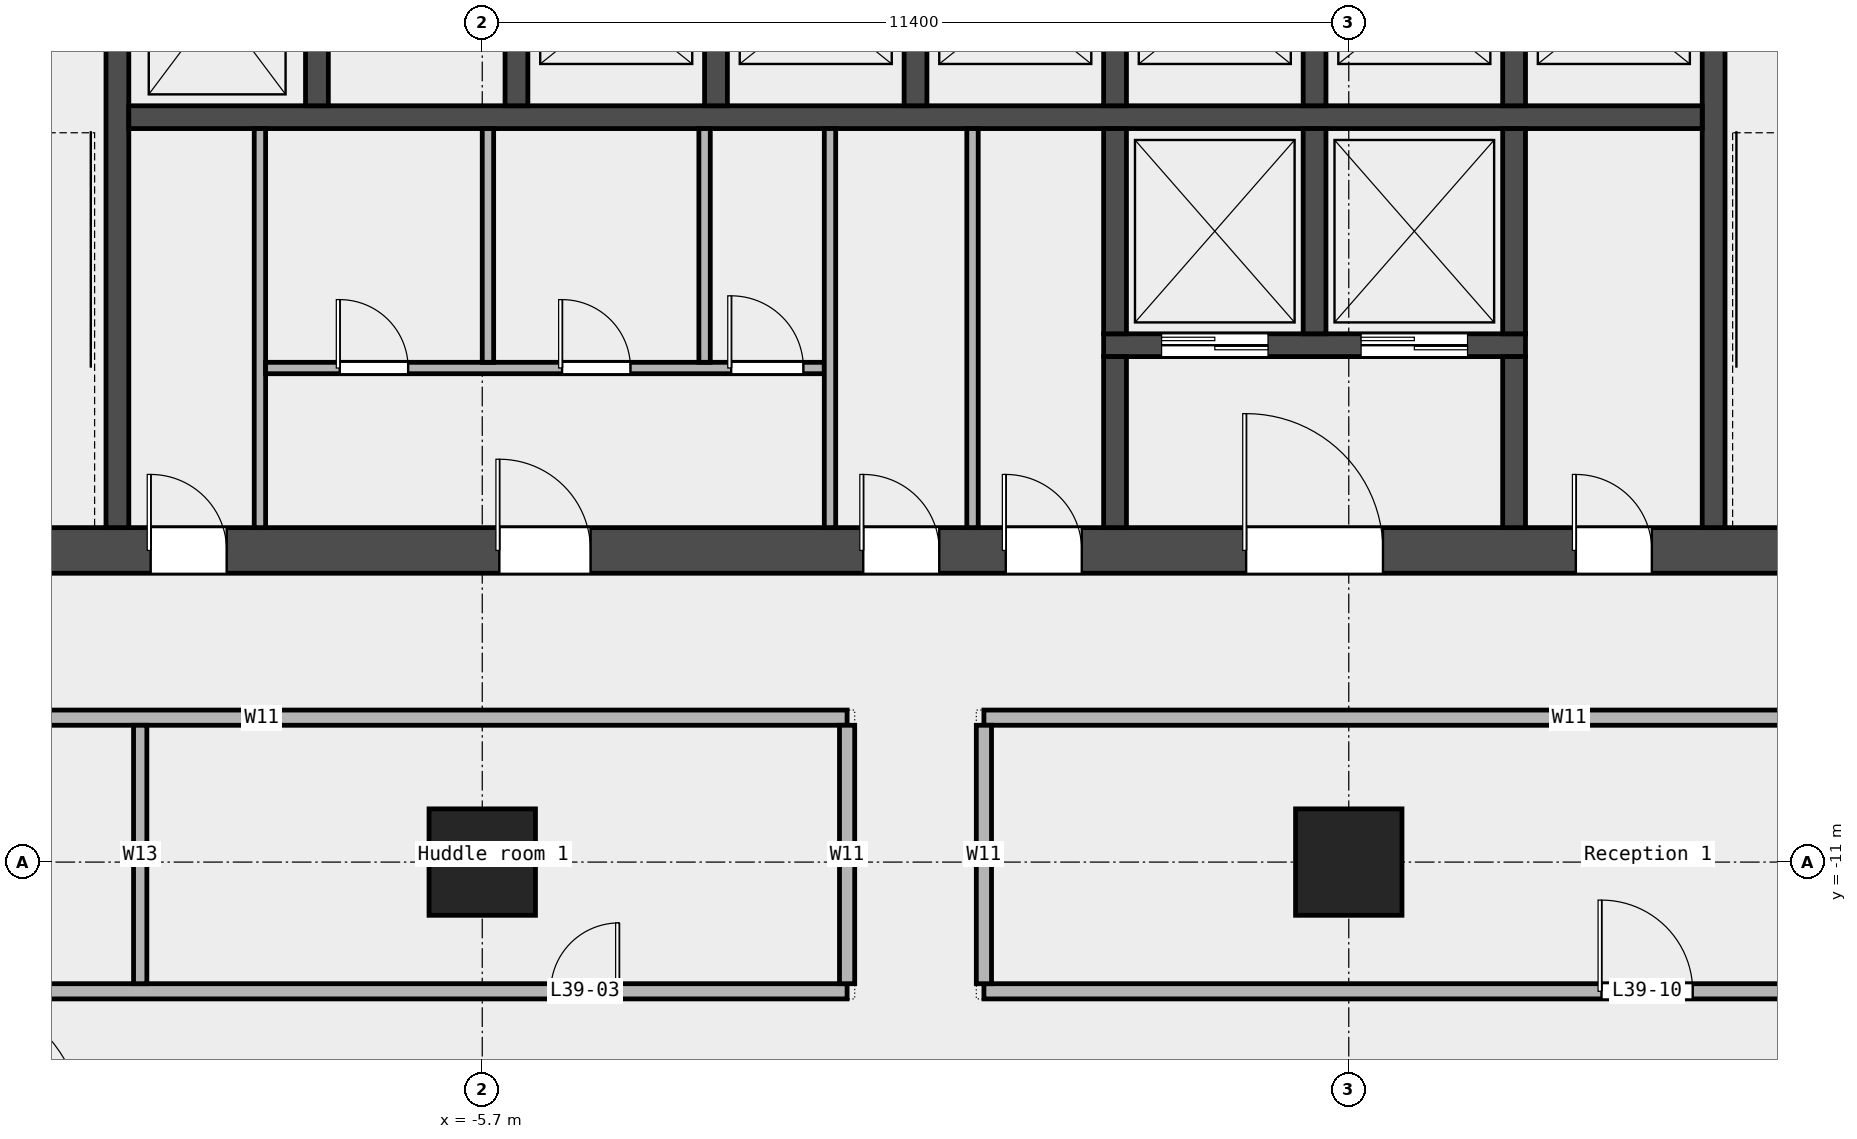
"""IFC4 building model, lengths in metres.
Left out: names, types, materials, properties, quantities, classifications, styles, units other than length and angle.
Written with IfcOpenShell. Run it as: python <this file> out.ifc"""

import sys

from ifc_helpers import new_model, si_unit, direction, frame, frame_2d, origin, origin_2d, place, context, subcontext, project, spatial, rectangle, extrude, element, fill, save


model = new_model("IFC4")
c1 = context("Model", 3, precision=1e-05, world=origin(), true_north=direction((0.0, 1.0)))
c2 = subcontext(c1, "Body", "Model", "MODEL_VIEW")
j1 = project(units=[si_unit("LENGTHUNIT", "METRE"), si_unit("PLANEANGLEUNIT", "RADIAN")], contexts=[c1])
p1 = place(None, origin())
s1 = spatial("IfcSite", under=j1, at=p1, CompositionType="ELEMENT")
p2 = place(p1, origin())
s2 = spatial("IfcBuilding", under=s1, at=p2, CompositionType="ELEMENT")
p3 = place(p2, frame((0.0, 0.0, 189.0)))
s3 = spatial("IfcBuildingStorey", under=s2, at=p3, CompositionType="ELEMENT", Elevation=189.0)
for number, where, z_axis, x_axis in (
    (1, (-5.7, -11.0, 0.0), (0.0, 0.0, 1.0), (1.0, 0.0, 0.0)),
    (2, (5.7, -11.0, 0.0), (0.0, 0.0, 1.0), (1.0, 0.0, 0.0)),
):
    element("IfcColumn", number, at=place(p3, frame(where, z_axis=z_axis, x_axis=x_axis)), inside=s3, PredefinedType="COLUMN", context=c2, shape_type="SweptSolid", body=[
        extrude(rectangle(XDim=1.4, YDim=1.4, at=origin_2d()), origin(), (0.0, 0.0, 1.0), 3.6),
    ])
p4 = place(p3, frame((-24.15, -12.7, 0.0), z_axis=(0.0, 0.0, 1.0), x_axis=(1.0, 0.0, 0.0)))
e3 = element("IfcWall", 3, at=p4, inside=s3, PredefinedType="PARTITIONING", context=c2, shape_type="SweptSolid", body=[
    extrude(rectangle(XDim=23.25, YDim=0.2, at=frame_2d((11.625, 0.0))), origin(), (0.0, 0.0, 1.0), 3.6),
])
p5 = place(p4, frame((19.35, 0.0, 0.0)))
e4 = element("IfcOpeningElement", 4, at=p5, cuts=e3, PredefinedType="OPENING", context=c2, shape_type="SweptSolid", body=[
    extrude(rectangle(XDim=0.9, YDim=2.1, at=frame_2d((0.45, 1.05))), frame((0.0, 0.112, 0.0), z_axis=(0.0, -1.0, 0.0), x_axis=(1.0, 0.0, 0.0)), (0.0, 0.0, 1.0), 0.224),
])
p6 = place(p4, frame((7.825, 0.0, 0.0)))
e5 = element("IfcOpeningElement", 5, at=p6, cuts=e3, PredefinedType="OPENING", context=c2, shape_type="SweptSolid", body=[
    extrude(rectangle(XDim=1.5, YDim=2.1, at=frame_2d((0.75, 1.05))), frame((0.0, 0.112, 0.0), z_axis=(0.0, -1.0, 0.0), x_axis=(1.0, 0.0, 0.0)), (0.0, 0.0, 1.0), 0.224),
])
p7 = place(p3, frame((0.9, -12.7, 0.0), z_axis=(0.0, 0.0, 1.0), x_axis=(1.0, 0.0, 0.0)))
e6 = element("IfcWall", 6, at=p7, inside=s3, PredefinedType="PARTITIONING", context=c2, shape_type="SweptSolid", body=[
    extrude(rectangle(XDim=25.25, YDim=0.2, at=frame_2d((12.625, 0.0))), origin(), (0.0, 0.0, 1.0), 3.6),
])
p8 = place(p7, frame((20.75, 0.0, 0.0)))
e7 = element("IfcOpeningElement", 7, at=p8, cuts=e6, PredefinedType="OPENING", context=c2, shape_type="SweptSolid", body=[
    extrude(rectangle(XDim=1.0, YDim=2.1, at=frame_2d((0.5, 1.05))), frame((0.0, 0.112, 0.0), z_axis=(0.0, -1.0, 0.0), x_axis=(1.0, 0.0, 0.0)), (0.0, 0.0, 1.0), 0.224),
])
p9 = place(p7, frame((8.125, 0.0, 0.0)))
e8 = element("IfcOpeningElement", 8, at=p9, cuts=e6, PredefinedType="OPENING", context=c2, shape_type="SweptSolid", body=[
    extrude(rectangle(XDim=1.2, YDim=2.1, at=frame_2d((0.6, 1.05))), frame((0.0, 0.112, 0.0), z_axis=(0.0, -1.0, 0.0), x_axis=(1.0, 0.0, 0.0)), (0.0, 0.0, 1.0), 0.224),
])
for number, where, z_axis, x_axis in (
    (9, (-16.3, -9.1, 0.0), (0.0, 0.0, 1.0), (1.0, 0.0, 0.0)),
    (10, (0.9, -9.1, 0.0), (0.0, 0.0, 1.0), (1.0, 0.0, 0.0)),
):
    element("IfcWall", number, at=place(p3, frame(where, z_axis=z_axis, x_axis=x_axis)), inside=s3, PredefinedType="PARTITIONING", context=c2, shape_type="SweptSolid", body=[
        extrude(rectangle(XDim=15.4, YDim=0.2, at=frame_2d((7.7, 0.0))), origin(), (0.0, 0.0, 1.0), 3.6),
    ])
p10 = place(p3, frame((-10.2, -12.6, 0.0), z_axis=(0.0, 0.0, 1.0), x_axis=(0.0, 1.0, 0.0)))
e11 = element("IfcWall", 11, at=p10, inside=s3, PredefinedType="PARTITIONING", context=c2, shape_type="SweptSolid", body=[
    extrude(rectangle(XDim=3.4, YDim=0.175, at=frame_2d((1.7, 0.0))), origin(), (0.0, 0.0, 1.0), 3.6),
])
for number, where, z_axis, x_axis in (
    (12, (-0.9, -12.6, 0.0), (0.0, 0.0, 1.0), (0.0, 1.0, 0.0)),
    (13, (0.9, -12.6, 0.0), (0.0, 0.0, 1.0), (0.0, 1.0, 0.0)),
):
    element("IfcWall", number, at=place(p3, frame(where, z_axis=z_axis, x_axis=x_axis)), inside=s3, PredefinedType="PARTITIONING", context=c2, shape_type="SweptSolid", body=[
        extrude(rectangle(XDim=3.4, YDim=0.2, at=frame_2d((1.7, 0.0))), origin(), (0.0, 0.0, 1.0), 3.6),
    ])
p11 = place(p3, frame((-14.4, -6.9, 0.0), z_axis=(0.0, 0.0, 1.0), x_axis=(1.0, 0.0, 0.0)))
e14 = element("IfcWall", 14, at=p11, inside=s3, PredefinedType="SHEAR", context=c2, shape_type="SweptSolid", body=[
    extrude(rectangle(XDim=28.8, YDim=0.6, at=frame_2d((14.4, 0.0))), origin(), (0.0, 0.0, 1.0), 3.7),
])
p12 = place(p11, frame((4.337, 0.0, 0.0)))
e15 = element("IfcOpeningElement", 15, at=p12, cuts=e14, PredefinedType="OPENING", context=c2, shape_type="SweptSolid", body=[
    extrude(rectangle(XDim=1.0, YDim=2.1, at=frame_2d((0.5, 1.05))), frame((0.0, 0.312, 0.0), z_axis=(0.0, -1.0, 0.0), x_axis=(1.0, 0.0, 0.0)), (0.0, 0.0, 1.0), 0.624),
])
p13 = place(p11, frame((8.925, 0.0, 0.0)))
e16 = element("IfcOpeningElement", 16, at=p13, cuts=e14, PredefinedType="OPENING", context=c2, shape_type="SweptSolid", body=[
    extrude(rectangle(XDim=1.2, YDim=2.1, at=frame_2d((0.6, 1.05))), frame((0.0, 0.312, 0.0), z_axis=(0.0, -1.0, 0.0), x_axis=(1.0, 0.0, 0.0)), (0.0, 0.0, 1.0), 0.624),
])
p14 = place(p11, frame((13.712, 0.0, 0.0)))
e17 = element("IfcOpeningElement", 17, at=p14, cuts=e14, PredefinedType="OPENING", context=c2, shape_type="SweptSolid", body=[
    extrude(rectangle(XDim=1.0, YDim=2.1, at=frame_2d((0.5, 1.05))), frame((0.0, 0.312, 0.0), z_axis=(0.0, -1.0, 0.0), x_axis=(1.0, 0.0, 0.0)), (0.0, 0.0, 1.0), 0.624),
])
p15 = place(p11, frame((15.587, 0.0, 0.0)))
e18 = element("IfcOpeningElement", 18, at=p15, cuts=e14, PredefinedType="OPENING", context=c2, shape_type="SweptSolid", body=[
    extrude(rectangle(XDim=1.0, YDim=2.1, at=frame_2d((0.5, 1.05))), frame((0.0, 0.312, 0.0), z_axis=(0.0, -1.0, 0.0), x_axis=(1.0, 0.0, 0.0)), (0.0, 0.0, 1.0), 0.624),
])
p16 = place(p11, frame((18.75, 0.0, 0.0)))
e19 = element("IfcOpeningElement", 19, at=p16, cuts=e14, PredefinedType="OPENING", context=c2, shape_type="SweptSolid", body=[
    extrude(rectangle(XDim=1.8, YDim=2.1, at=frame_2d((0.9, 1.05))), frame((0.0, 0.312, 0.0), z_axis=(0.0, -1.0, 0.0), x_axis=(1.0, 0.0, 0.0)), (0.0, 0.0, 1.0), 0.624),
])
p17 = place(p11, frame((23.087, 0.0, 0.0)))
e20 = element("IfcOpeningElement", 20, at=p17, cuts=e14, PredefinedType="OPENING", context=c2, shape_type="SweptSolid", body=[
    extrude(rectangle(XDim=1.0, YDim=2.1, at=frame_2d((0.5, 1.05))), frame((0.0, 0.312, 0.0), z_axis=(0.0, -1.0, 0.0), x_axis=(1.0, 0.0, 0.0)), (0.0, 0.0, 1.0), 0.624),
])
for number, where, z_axis, x_axis in (
    (21, (-10.5, -6.6, 0.0), (0.0, 0.0, 1.0), (0.0, 1.0, 0.0)),
    (22, (10.5, -6.6, 0.0), (0.0, 0.0, 1.0), (0.0, 1.0, 0.0)),
):
    element("IfcWall", number, at=place(p3, frame(where, z_axis=z_axis, x_axis=x_axis)), inside=s3, PredefinedType="SHEAR", context=c2, shape_type="SweptSolid", body=[
        extrude(rectangle(XDim=8.55, YDim=0.3, at=frame_2d((4.275, 0.0))), origin(), (0.0, 0.0, 1.0), 3.7),
    ])
p18 = place(p3, frame((-10.35, -1.2, 0.0), z_axis=(0.0, 0.0, 1.0), x_axis=(1.0, 0.0, 0.0)))
e23 = element("IfcWall", 23, at=p18, inside=s3, PredefinedType="SOLIDWALL", context=c2, shape_type="SweptSolid", body=[
    extrude(rectangle(XDim=20.7, YDim=0.3, at=frame_2d((10.35, 0.0))), origin(), (0.0, 0.0, 1.0), 3.7),
])
for number, where, z_axis, x_axis in (
    (24, (-7.875, -1.05, 0.0), (0.0, 0.0, 1.0), (0.0, 1.0, 0.0)),
    (25, (-5.25, -1.05, 0.0), (0.0, 0.0, 1.0), (0.0, 1.0, 0.0)),
    (26, (-2.625, -1.05, 0.0), (0.0, 0.0, 1.0), (0.0, 1.0, 0.0)),
    (27, (0.0, -1.05, 0.0), (0.0, 0.0, 1.0), (0.0, 1.0, 0.0)),
    (28, (2.625, -1.05, 0.0), (0.0, 0.0, 1.0), (0.0, 1.0, 0.0)),
    (29, (5.25, -1.05, 0.0), (0.0, 0.0, 1.0), (0.0, 1.0, 0.0)),
    (30, (7.875, -1.05, 0.0), (0.0, 0.0, 1.0), (0.0, 1.0, 0.0)),
):
    element("IfcWall", number, at=place(p3, frame(where, z_axis=z_axis, x_axis=x_axis)), inside=s3, PredefinedType="SOLIDWALL", context=c2, shape_type="SweptSolid", body=[
        extrude(rectangle(XDim=2.7, YDim=0.3, at=frame_2d((1.35, 0.0))), origin(), (0.0, 0.0, 1.0), 3.7),
    ])
p19 = place(p3, frame((2.475, -4.2, 0.0), z_axis=(0.0, 0.0, 1.0), x_axis=(1.0, 0.0, 0.0)))
e31 = element("IfcWall", 31, at=p19, inside=s3, PredefinedType="SOLIDWALL", context=c2, shape_type="SweptSolid", body=[
    extrude(rectangle(XDim=5.55, YDim=0.3, at=frame_2d((2.775, 0.0))), origin(), (0.0, 0.0, 1.0), 3.7),
])
p20 = place(p19, frame((0.762, 0.0, 0.0)))
e32 = element("IfcOpeningElement", 32, at=p20, cuts=e31, PredefinedType="OPENING", context=c2, shape_type="SweptSolid", body=[
    extrude(rectangle(XDim=1.4, YDim=2.1, at=frame_2d((0.7, 1.05))), frame((0.0, 0.162, 0.0), z_axis=(0.0, -1.0, 0.0), x_axis=(1.0, 0.0, 0.0)), (0.0, 0.0, 1.0), 0.324),
])
p21 = place(p19, frame((3.387, 0.0, 0.0)))
e33 = element("IfcOpeningElement", 33, at=p21, cuts=e31, PredefinedType="OPENING", context=c2, shape_type="SweptSolid", body=[
    extrude(rectangle(XDim=1.4, YDim=2.1, at=frame_2d((0.7, 1.05))), frame((0.0, 0.162, 0.0), z_axis=(0.0, -1.0, 0.0), x_axis=(1.0, 0.0, 0.0)), (0.0, 0.0, 1.0), 0.324),
])
p22 = place(p3, frame((2.625, -4.05, 0.0), z_axis=(0.0, 0.0, 1.0), x_axis=(0.0, 1.0, 0.0)))
e34 = element("IfcWall", 34, at=p22, inside=s3, PredefinedType="SOLIDWALL", context=c2, shape_type="SweptSolid", body=[
    extrude(rectangle(XDim=2.7, YDim=0.3, at=frame_2d((1.35, 0.0))), origin(), (0.0, 0.0, 1.0), 3.7),
])
p23 = place(p3, frame((2.625, -6.6, 0.0), z_axis=(0.0, 0.0, 1.0), x_axis=(0.0, 1.0, 0.0)))
e35 = element("IfcWall", 35, at=p23, inside=s3, PredefinedType="SOLIDWALL", context=c2, shape_type="SweptSolid", body=[
    extrude(rectangle(XDim=2.25, YDim=0.3, at=frame_2d((1.125, 0.0))), origin(), (0.0, 0.0, 1.0), 3.7),
])
for number, where, z_axis, x_axis in (
    (36, (5.25, -4.05, 0.0), (0.0, 0.0, 1.0), (0.0, 1.0, 0.0)),
    (37, (7.875, -4.05, 0.0), (0.0, 0.0, 1.0), (0.0, 1.0, 0.0)),
):
    element("IfcWall", number, at=place(p3, frame(where, z_axis=z_axis, x_axis=x_axis)), inside=s3, PredefinedType="SOLIDWALL", context=c2, shape_type="SweptSolid", body=[
        extrude(rectangle(XDim=2.7, YDim=0.3, at=frame_2d((1.35, 0.0))), origin(), (0.0, 0.0, 1.0), 3.7),
    ])
p24 = place(p3, frame((7.875, -6.6, 0.0), z_axis=(0.0, 0.0, 1.0), x_axis=(0.0, 1.0, 0.0)))
e38 = element("IfcWall", 38, at=p24, inside=s3, PredefinedType="SOLIDWALL", context=c2, shape_type="SweptSolid", body=[
    extrude(rectangle(XDim=2.25, YDim=0.3, at=frame_2d((1.125, 0.0))), origin(), (0.0, 0.0, 1.0), 3.7),
])
p25 = place(p3, frame((-8.625, -6.6, 0.0), z_axis=(0.0, 0.0, 1.0), x_axis=(0.0, 1.0, 0.0)))
e39 = element("IfcWall", 39, at=p25, inside=s3, PredefinedType="PARTITIONING", context=c2, shape_type="SweptSolid", body=[
    extrude(rectangle(XDim=5.25, YDim=0.15, at=frame_2d((2.625, 0.0))), origin(), (0.0, 0.0, 1.0), 3.7),
])
p26 = place(p3, frame((-8.55, -4.5, 0.0), z_axis=(0.0, 0.0, 1.0), x_axis=(1.0, 0.0, 0.0)))
e40 = element("IfcWall", 40, at=p26, inside=s3, PredefinedType="PARTITIONING", context=c2, shape_type="SweptSolid", body=[
    extrude(rectangle(XDim=7.35, YDim=0.15, at=frame_2d((3.675, 0.0))), origin(), (0.0, 0.0, 1.0), 3.7),
])
p27 = place(p26, frame((0.975, 0.0, 0.0)))
e41 = element("IfcOpeningElement", 41, at=p27, cuts=e40, PredefinedType="OPENING", context=c2, shape_type="SweptSolid", body=[
    extrude(rectangle(XDim=0.9, YDim=2.1, at=frame_2d((0.45, 1.05))), frame((0.0, 0.087, 0.0), z_axis=(0.0, -1.0, 0.0), x_axis=(1.0, 0.0, 0.0)), (0.0, 0.0, 1.0), 0.174),
])
p28 = place(p26, frame((3.9, 0.0, 0.0)))
e42 = element("IfcOpeningElement", 42, at=p28, cuts=e40, PredefinedType="OPENING", context=c2, shape_type="SweptSolid", body=[
    extrude(rectangle(XDim=0.9, YDim=2.1, at=frame_2d((0.45, 1.05))), frame((0.0, 0.087, 0.0), z_axis=(0.0, -1.0, 0.0), x_axis=(1.0, 0.0, 0.0)), (0.0, 0.0, 1.0), 0.174),
])
p29 = place(p26, frame((6.125, 0.0, 0.0)))
e43 = element("IfcOpeningElement", 43, at=p29, cuts=e40, PredefinedType="OPENING", context=c2, shape_type="SweptSolid", body=[
    extrude(rectangle(XDim=0.95, YDim=2.1, at=frame_2d((0.475, 1.05))), frame((0.0, 0.087, 0.0), z_axis=(0.0, -1.0, 0.0), x_axis=(1.0, 0.0, 0.0)), (0.0, 0.0, 1.0), 0.174),
])
for number, where, z_axis, x_axis in (
    (44, (-5.625, -4.425, 0.0), (0.0, 0.0, 1.0), (0.0, 1.0, 0.0)),
    (45, (-2.775, -4.425, 0.0), (0.0, 0.0, 1.0), (0.0, 1.0, 0.0)),
):
    element("IfcWall", number, at=place(p3, frame(where, z_axis=z_axis, x_axis=x_axis)), inside=s3, PredefinedType="PARTITIONING", context=c2, shape_type="SweptSolid", body=[
        extrude(rectangle(XDim=3.075, YDim=0.15, at=frame_2d((1.538, 0.0))), origin(), (0.0, 0.0, 1.0), 3.7),
    ])
for number, where, z_axis, x_axis in (
    (46, (-1.125, -6.6, 0.0), (0.0, 0.0, 1.0), (0.0, 1.0, 0.0)),
    (47, (0.75, -6.6, 0.0), (0.0, 0.0, 1.0), (0.0, 1.0, 0.0)),
):
    element("IfcWall", number, at=place(p3, frame(where, z_axis=z_axis, x_axis=x_axis)), inside=s3, PredefinedType="PARTITIONING", context=c2, shape_type="SweptSolid", body=[
        extrude(rectangle(XDim=5.25, YDim=0.15, at=frame_2d((2.625, 0.0))), origin(), (0.0, 0.0, 1.0), 3.7),
    ])
p30 = place(p5, origin())
e48 = element("IfcDoor", 48, at=p30, inside=s3, OperationType="SINGLE_SWING_RIGHT", PredefinedType="DOOR", context=c2, shape_type="SweptSolid", body=[
    extrude(rectangle(XDim=0.9, YDim=2.1, at=frame_2d((0.45, 1.05))), frame((0.0, 0.025, 0.0), z_axis=(0.0, -1.0, 0.0), x_axis=(1.0, 0.0, 0.0)), (0.0, 0.0, 1.0), 0.05),
])
fill(e4, e48)
p31 = place(p9, origin())
e49 = element("IfcDoor", 49, at=p31, inside=s3, OperationType="SINGLE_SWING_LEFT", PredefinedType="DOOR", context=c2, shape_type="SweptSolid", body=[
    extrude(rectangle(XDim=1.2, YDim=2.1, at=frame_2d((0.6, 1.05))), frame((0.0, 0.025, 0.0), z_axis=(0.0, -1.0, 0.0), x_axis=(1.0, 0.0, 0.0)), (0.0, 0.0, 1.0), 0.05),
])
fill(e8, e49)
p32 = place(p20, origin())
e50 = element("IfcDoor", 50, at=p32, inside=s3, OperationType="DOUBLE_DOOR_SLIDING", PredefinedType="DOOR", context=c2, shape_type="SweptSolid", body=[
    extrude(rectangle(XDim=1.4, YDim=2.1, at=frame_2d((0.7, 1.05))), frame((0.0, 0.025, 0.0), z_axis=(0.0, -1.0, 0.0), x_axis=(1.0, 0.0, 0.0)), (0.0, 0.0, 1.0), 0.05),
])
fill(e32, e50)
p33 = place(p21, origin())
e51 = element("IfcDoor", 51, at=p33, inside=s3, OperationType="DOUBLE_DOOR_SLIDING", PredefinedType="DOOR", context=c2, shape_type="SweptSolid", body=[
    extrude(rectangle(XDim=1.4, YDim=2.1, at=frame_2d((0.7, 1.05))), frame((0.0, 0.025, 0.0), z_axis=(0.0, -1.0, 0.0), x_axis=(1.0, 0.0, 0.0)), (0.0, 0.0, 1.0), 0.05),
])
fill(e33, e51)
p34 = place(p12, origin())
e52 = element("IfcDoor", 52, at=p34, inside=s3, OperationType="SINGLE_SWING_LEFT", PredefinedType="DOOR", context=c2, shape_type="SweptSolid", body=[
    extrude(rectangle(XDim=1.0, YDim=2.1, at=frame_2d((0.5, 1.05))), frame((0.0, 0.025, 0.0), z_axis=(0.0, -1.0, 0.0), x_axis=(1.0, 0.0, 0.0)), (0.0, 0.0, 1.0), 0.05),
])
fill(e15, e52)
p35 = place(p13, origin())
e53 = element("IfcDoor", 53, at=p35, inside=s3, OperationType="SINGLE_SWING_LEFT", PredefinedType="DOOR", context=c2, shape_type="SweptSolid", body=[
    extrude(rectangle(XDim=1.2, YDim=2.1, at=frame_2d((0.6, 1.05))), frame((0.0, 0.025, 0.0), z_axis=(0.0, -1.0, 0.0), x_axis=(1.0, 0.0, 0.0)), (0.0, 0.0, 1.0), 0.05),
])
fill(e16, e53)
p36 = place(p27, origin())
e54 = element("IfcDoor", 54, at=p36, inside=s3, OperationType="SINGLE_SWING_LEFT", PredefinedType="DOOR", context=c2, shape_type="SweptSolid", body=[
    extrude(rectangle(XDim=0.9, YDim=2.1, at=frame_2d((0.45, 1.05))), frame((0.0, 0.025, 0.0), z_axis=(0.0, -1.0, 0.0), x_axis=(1.0, 0.0, 0.0)), (0.0, 0.0, 1.0), 0.05),
])
fill(e41, e54)
p37 = place(p28, origin())
e55 = element("IfcDoor", 55, at=p37, inside=s3, OperationType="SINGLE_SWING_LEFT", PredefinedType="DOOR", context=c2, shape_type="SweptSolid", body=[
    extrude(rectangle(XDim=0.9, YDim=2.1, at=frame_2d((0.45, 1.05))), frame((0.0, 0.025, 0.0), z_axis=(0.0, -1.0, 0.0), x_axis=(1.0, 0.0, 0.0)), (0.0, 0.0, 1.0), 0.05),
])
fill(e42, e55)
p38 = place(p29, origin())
e56 = element("IfcDoor", 56, at=p38, inside=s3, OperationType="SINGLE_SWING_LEFT", PredefinedType="DOOR", context=c2, shape_type="SweptSolid", body=[
    extrude(rectangle(XDim=0.95, YDim=2.1, at=frame_2d((0.475, 1.05))), frame((0.0, 0.025, 0.0), z_axis=(0.0, -1.0, 0.0), x_axis=(1.0, 0.0, 0.0)), (0.0, 0.0, 1.0), 0.05),
])
fill(e43, e56)
p39 = place(p14, origin())
e57 = element("IfcDoor", 57, at=p39, inside=s3, OperationType="SINGLE_SWING_LEFT", PredefinedType="DOOR", context=c2, shape_type="SweptSolid", body=[
    extrude(rectangle(XDim=1.0, YDim=2.1, at=frame_2d((0.5, 1.05))), frame((0.0, 0.025, 0.0), z_axis=(0.0, -1.0, 0.0), x_axis=(1.0, 0.0, 0.0)), (0.0, 0.0, 1.0), 0.05),
])
fill(e17, e57)
p40 = place(p15, origin())
e58 = element("IfcDoor", 58, at=p40, inside=s3, OperationType="SINGLE_SWING_LEFT", PredefinedType="DOOR", context=c2, shape_type="SweptSolid", body=[
    extrude(rectangle(XDim=1.0, YDim=2.1, at=frame_2d((0.5, 1.05))), frame((0.0, 0.025, 0.0), z_axis=(0.0, -1.0, 0.0), x_axis=(1.0, 0.0, 0.0)), (0.0, 0.0, 1.0), 0.05),
])
fill(e18, e58)
p41 = place(p16, origin())
e59 = element("IfcDoor", 59, at=p41, inside=s3, OperationType="DOUBLE_DOOR_SINGLE_SWING", PredefinedType="DOOR", context=c2, shape_type="SweptSolid", body=[
    extrude(rectangle(XDim=1.8, YDim=2.1, at=frame_2d((0.9, 1.05))), frame((0.0, 0.025, 0.0), z_axis=(0.0, -1.0, 0.0), x_axis=(1.0, 0.0, 0.0)), (0.0, 0.0, 1.0), 0.05),
])
fill(e19, e59)
p42 = place(p17, origin())
e60 = element("IfcDoor", 60, at=p42, inside=s3, OperationType="SINGLE_SWING_LEFT", PredefinedType="DOOR", context=c2, shape_type="SweptSolid", body=[
    extrude(rectangle(XDim=1.0, YDim=2.1, at=frame_2d((0.5, 1.05))), frame((0.0, 0.025, 0.0), z_axis=(0.0, -1.0, 0.0), x_axis=(1.0, 0.0, 0.0)), (0.0, 0.0, 1.0), 0.05),
])
fill(e20, e60)
save(model, sys.argv[1])
